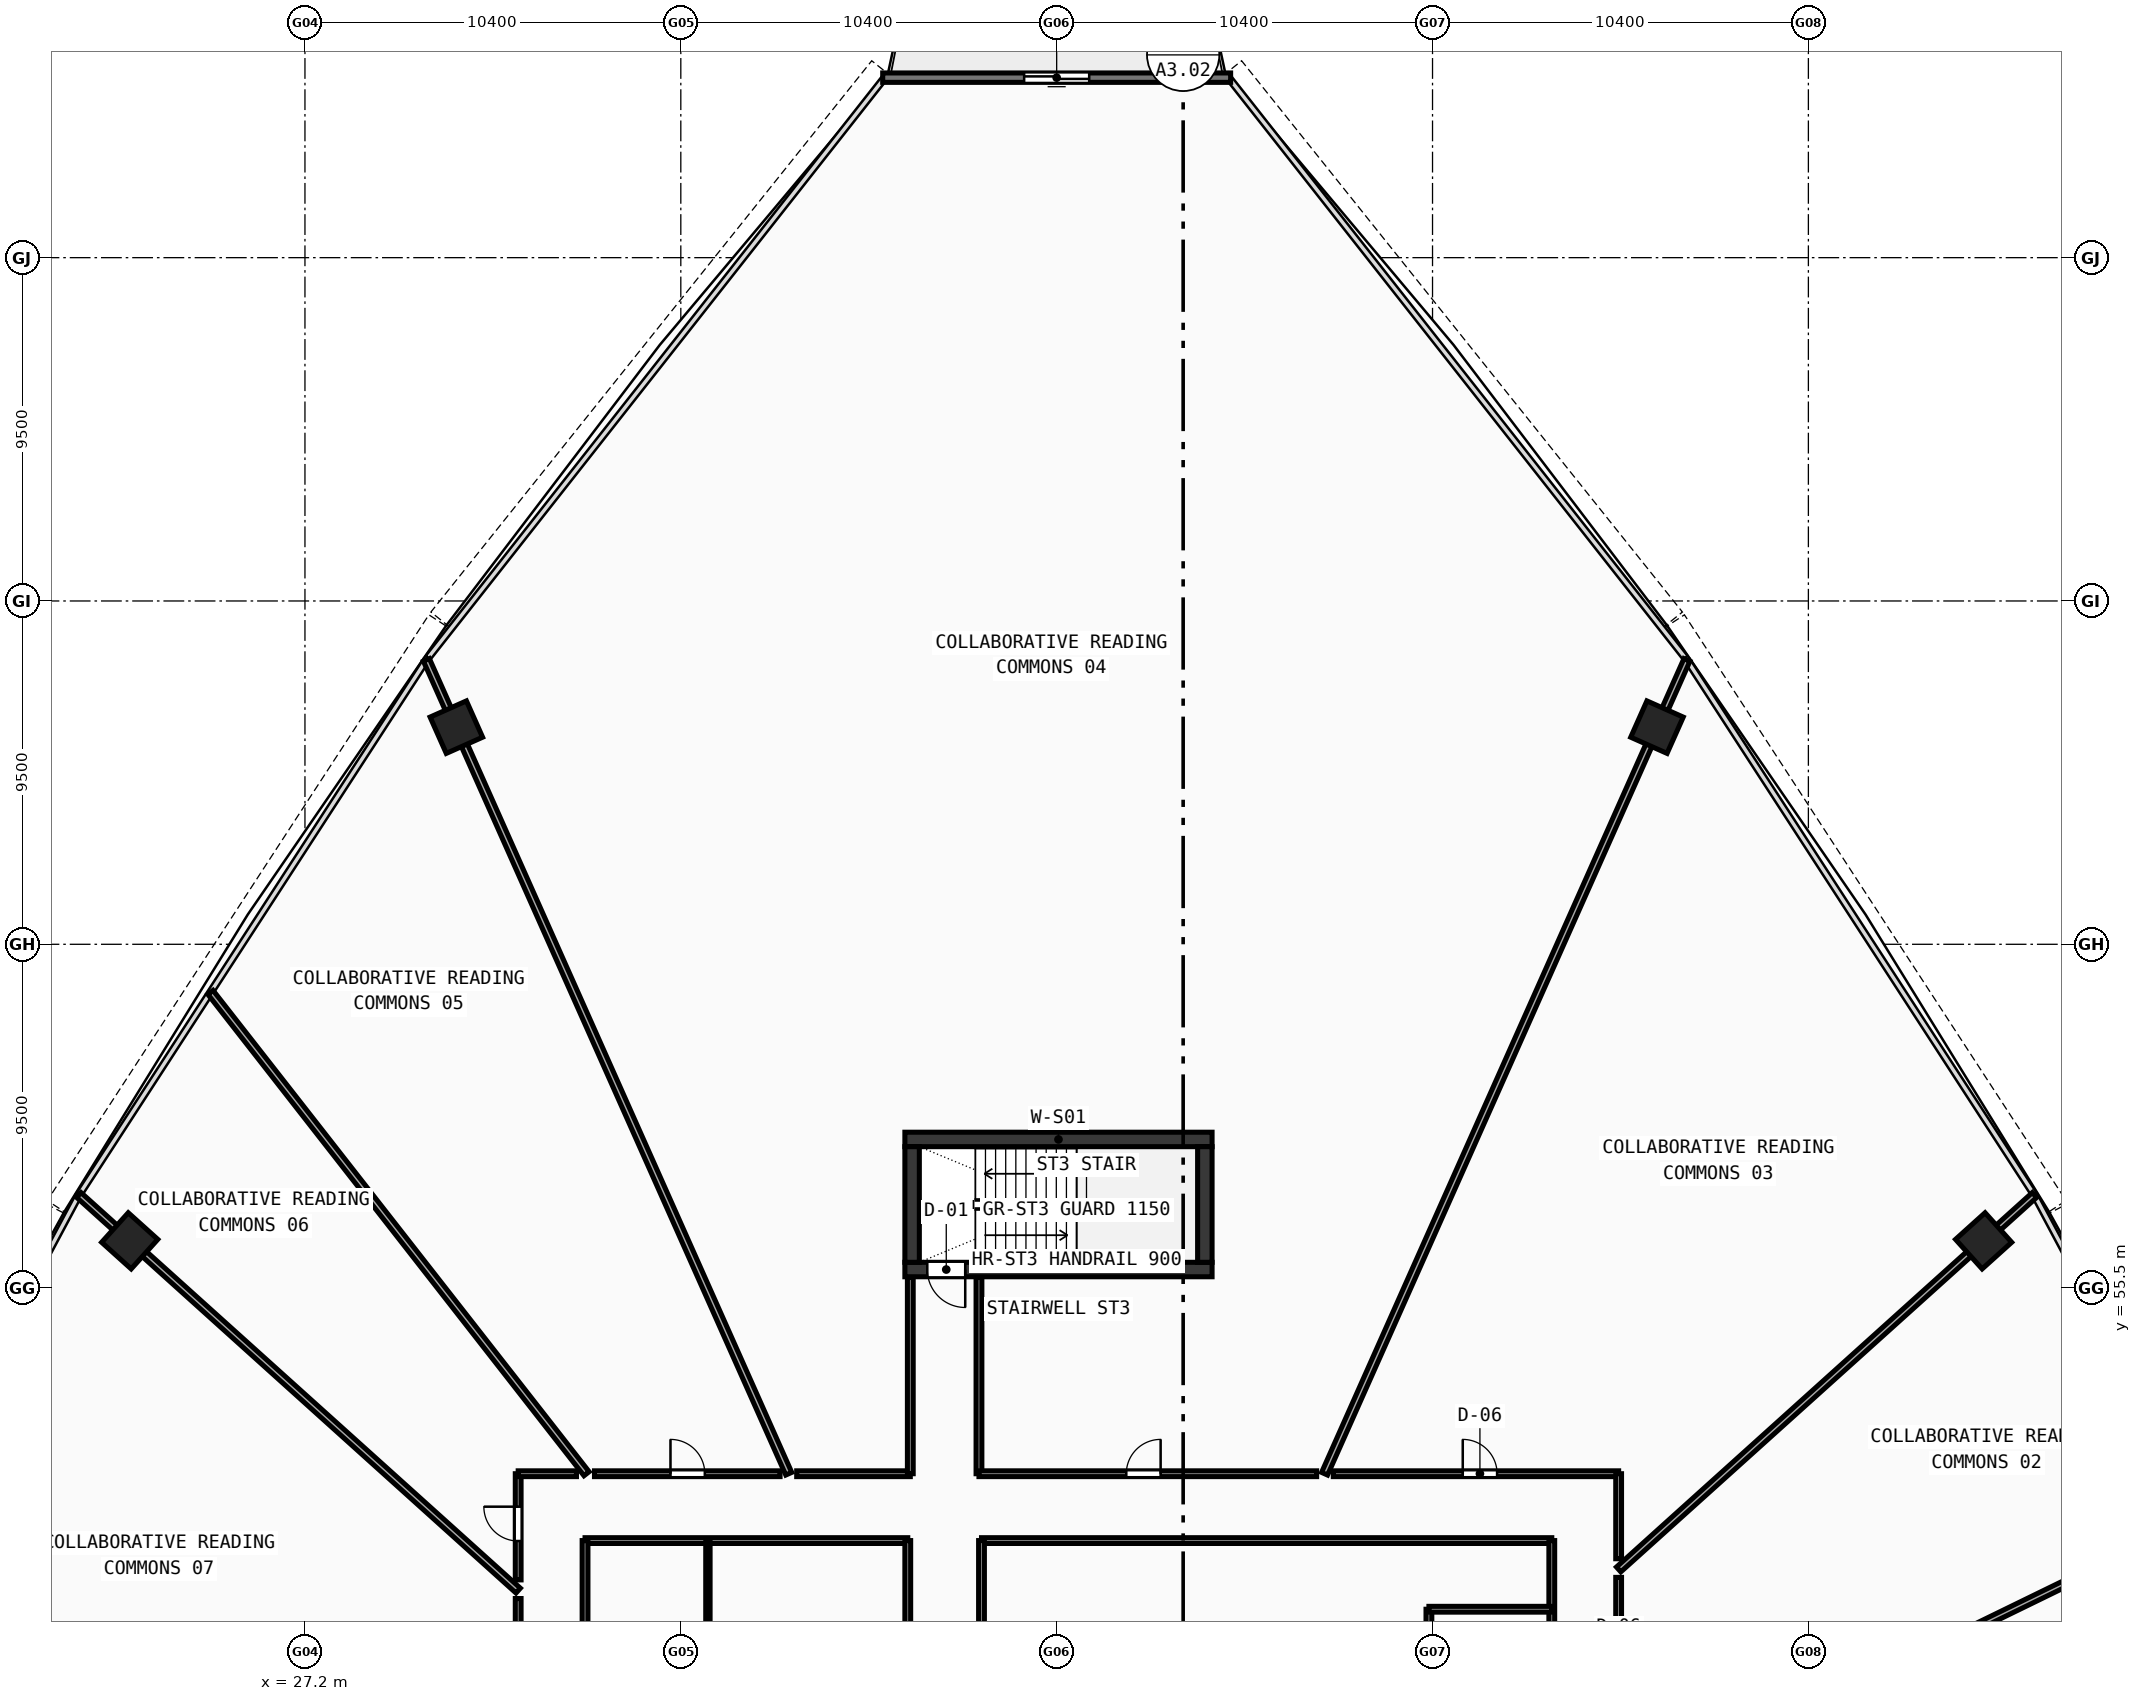
"""IFC4 building model, lengths in metres.
Left out: names, types, materials, properties, quantities, classifications, styles, units other than length and angle.
Written with IfcOpenShell. Run it as: python <this file> out.ifc"""

import sys

from ifc_helpers import new_model, si_unit, direction, frame, frame_2d, origin, origin_with_axes, origin_2d, place, context, subcontext, project, spatial, rectangle, hollow_rectangle, extrude, source, transform, mapped, element, fill, save


model = new_model("IFC4")
c1 = context("Model", 3, precision=1e-05, world=origin(), true_north=direction((0.0, 1.0)))
c2 = subcontext(c1, "Body", "Model", "MODEL_VIEW")
j1 = project(units=[si_unit("LENGTHUNIT", "METRE"), si_unit("PLANEANGLEUNIT", "RADIAN")], contexts=[c1])
p1 = place(None, origin())
s1 = spatial("IfcSite", under=j1, at=p1, CompositionType="ELEMENT")
p2 = place(p1, origin())
s2 = spatial("IfcBuilding", under=s1, at=p2, CompositionType="ELEMENT")
p3 = place(p2, frame((0.0, 0.0, 34.03)))
s3 = spatial("IfcBuildingStorey", under=s2, at=p3, CompositionType="ELEMENT", Elevation=34.03)
p4 = place(p3, frame((43.8, 59.6, 0.0), z_axis=(0.0, 0.0, 1.0), x_axis=(1.0, 0.0, 0.0)))
e1 = element("IfcWall", 1, at=p4, inside=s3, PredefinedType="SHEAR", context=c2, shape_type="SweptSolid", body=[
    extrude(rectangle(XDim=8.5, YDim=0.4, at=frame_2d((4.25, 0.0))), origin(), (0.0, 0.0, 1.0), 3.37),
])
p5 = place(p3, frame((43.8, 56.0, 0.0), z_axis=(0.0, 0.0, 1.0), x_axis=(1.0, 0.0, 0.0)))
e2 = element("IfcWall", 2, at=p5, inside=s3, PredefinedType="SHEAR", context=c2, shape_type="SweptSolid", body=[
    extrude(rectangle(XDim=8.5, YDim=0.4, at=frame_2d((4.25, 0.0))), origin(), (0.0, 0.0, 1.0), 3.37),
])
p6 = place(p5, frame((0.62, 0.0, 0.0)))
e3 = element("IfcOpeningElement", 3, at=p6, cuts=e2, PredefinedType="OPENING", context=c2, shape_type="SweptSolid", body=[
    extrude(rectangle(XDim=1.05, YDim=2.1, at=frame_2d((0.525, 1.05))), frame((0.0, 0.21, 0.0), z_axis=(0.0, -1.0, 0.0), x_axis=(1.0, 0.0, 0.0)), (0.0, 0.0, 1.0), 0.42),
])
for number, where, z_axis, x_axis in (
    (4, (44.0, 56.2, 0.0), (0.0, 0.0, 1.0), (0.0, 1.0, 0.0)),
    (5, (52.1, 56.2, 0.0), (0.0, 0.0, 1.0), (0.0, 1.0, 0.0)),
):
    element("IfcWall", number, at=place(p3, frame(where, z_axis=z_axis, x_axis=x_axis)), inside=s3, PredefinedType="SHEAR", context=c2, shape_type="SweptSolid", body=[
        extrude(rectangle(XDim=3.2, YDim=0.4, at=frame_2d((1.6, 0.0))), origin(), (0.0, 0.0, 1.0), 3.37),
    ])
m1 = source(origin(), c2, "Body", "SweptSolid", [
    extrude(hollow_rectangle(XDim=1.1, YDim=1.1, WallThickness=0.045, at=origin_2d()), origin(), (0.0, 0.0, 1.0), 3.63),
])
for number, where, z_axis, x_axis in (
    (6, (73.649, 56.794, -0.26), (0.0, 0.0, 1.0), (-0.669, 0.743, 0.0)),
    (7, (64.611, 71.009, -0.26), (0.0, 0.0, 1.0), (-0.914, 0.407, 0.0)),
    (8, (31.389, 71.009, -0.26), (0.0, 0.0, 1.0), (-0.914, -0.407, 0.0)),
    (9, (22.351, 56.794, -0.26), (0.0, 0.0, 1.0), (-0.669, -0.743, 0.0)),
):
    element("IfcColumn", number, at=place(p3, frame(where, z_axis=z_axis, x_axis=x_axis)), inside=s3, PredefinedType="COLUMN", context=c2, shape_type="MappedRepresentation", body=[
        mapped(m1, transform((0.0, 0.0, 0.0), scale=1.0)),
    ])
p7 = place(p3, frame((52.814, 88.981, 0.0), z_axis=(0.0, 0.0, 1.0), x_axis=(-1.0, 0.0, 0.0)))
e10 = element("IfcWall", 10, at=p7, inside=s3, PredefinedType="STANDARD", context=c2, shape_type="SweptSolid", body=[
    extrude(rectangle(XDim=9.627, YDim=0.26, at=frame_2d((4.814, 0.0))), origin(), (0.0, 0.0, 1.0), 3.37),
])
p8 = place(p7, frame((3.914, 0.0, 0.0)))
e11 = element("IfcOpeningElement", 11, at=p8, cuts=e10, PredefinedType="OPENING", context=c2, shape_type="SweptSolid", body=[
    extrude(rectangle(XDim=1.8, YDim=2.15, at=frame_2d((0.9, 1.075))), frame((0.0, 0.14, 0.0), z_axis=(0.0, -1.0, 0.0), x_axis=(1.0, 0.0, 0.0)), (0.0, 0.0, 1.0), 0.28),
])
p9 = place(p3, frame((34.95, 48.5, 0.0), z_axis=(0.0, 0.0, 1.0), x_axis=(1.0, 0.0, 0.0)))
e12 = element("IfcWall", 12, at=p9, inside=s3, PredefinedType="PARTITIONING", context=c2, shape_type="SweptSolid", body=[
    extrude(rectangle(XDim=8.93, YDim=0.16, at=frame_2d((4.465, 0.0))), origin(), (0.0, 0.0, 1.0), 2.67),
])
for number, where, z_axis, x_axis in (
    (13, (34.95, 42.25, 0.0), (0.0, 0.0, 1.0), (0.0, 1.0, 0.0)),
    (14, (43.88, 42.25, 0.0), (0.0, 0.0, 1.0), (0.0, 1.0, 0.0)),
):
    element("IfcWall", number, at=place(p3, frame(where, z_axis=z_axis, x_axis=x_axis)), inside=s3, PredefinedType="PARTITIONING", context=c2, shape_type="SweptSolid", body=[
        extrude(rectangle(XDim=6.25, YDim=0.16, at=frame_2d((3.125, 0.0))), origin(), (0.0, 0.0, 1.0), 2.67),
    ])
p10 = place(p3, frame((38.35, 42.25, 0.0), z_axis=(0.0, 0.0, 1.0), x_axis=(0.0, 1.0, 0.0)))
e15 = element("IfcWall", 15, at=p10, inside=s3, PredefinedType="PARTITIONING", context=c2, shape_type="SweptSolid", body=[
    extrude(rectangle(XDim=6.25, YDim=0.12, at=frame_2d((3.125, 0.0))), origin(), (0.0, 0.0, 1.0), 2.67),
])
p11 = place(p3, frame((45.92, 48.5, 0.0), z_axis=(0.0, 0.0, 1.0), x_axis=(1.0, 0.0, 0.0)))
e16 = element("IfcWall", 16, at=p11, inside=s3, PredefinedType="PARTITIONING", context=c2, shape_type="SweptSolid", body=[
    extrude(rectangle(XDim=15.78, YDim=0.16, at=frame_2d((7.89, 0.0))), origin(), (0.0, 0.0, 1.0), 2.67),
])
p12 = place(p3, frame((45.92, 42.25, 0.0), z_axis=(0.0, 0.0, 1.0), x_axis=(0.0, 1.0, 0.0)))
e17 = element("IfcWall", 17, at=p12, inside=s3, PredefinedType="PARTITIONING", context=c2, shape_type="SweptSolid", body=[
    extrude(rectangle(XDim=6.25, YDim=0.16, at=frame_2d((3.125, 0.0))), origin(), (0.0, 0.0, 1.0), 3.37),
])
p13 = place(p3, frame((61.7, 42.25, 0.0), z_axis=(0.0, 0.0, 1.0), x_axis=(0.0, 1.0, 0.0)))
e18 = element("IfcWall", 18, at=p13, inside=s3, PredefinedType="PARTITIONING", context=c2, shape_type="SweptSolid", body=[
    extrude(rectangle(XDim=6.25, YDim=0.16, at=frame_2d((3.125, 0.0))), origin(), (0.0, 0.0, 1.0), 2.67),
])
p14 = place(p3, frame((58.3, 42.25, 0.0), z_axis=(0.0, 0.0, 1.0), x_axis=(0.0, 1.0, 0.0)))
e19 = element("IfcWall", 19, at=p14, inside=s3, PredefinedType="PARTITIONING", context=c2, shape_type="SweptSolid", body=[
    extrude(rectangle(XDim=4.35, YDim=0.16, at=frame_2d((2.175, 0.0))), origin(), (0.0, 0.0, 1.0), 2.67),
])
p15 = place(p3, frame((58.3, 46.6, 0.0), z_axis=(0.0, 0.0, 1.0), x_axis=(1.0, 0.0, 0.0)))
e20 = element("IfcWall", 20, at=p15, inside=s3, PredefinedType="PARTITIONING", context=c2, shape_type="SweptSolid", body=[
    extrude(rectangle(XDim=3.4, YDim=0.16, at=frame_2d((1.7, 0.0))), origin(), (0.0, 0.0, 1.0), 2.97),
])
p16 = place(p3, frame((63.55, 41.284, 0.0), z_axis=(0.0, 0.0, 1.0), x_axis=(0.898792344086, 0.438374636825, 0.0)))
e21 = element("IfcWall", 21, at=p16, inside=s3, PredefinedType="PARTITIONING", context=c2, shape_type="SweptSolid", body=[
    extrude(rectangle(XDim=18.064, YDim=0.18, at=frame_2d((9.032, 0.0))), origin(), (0.0, 0.0, 1.0), 2.67),
])
p17 = place(p3, frame((63.55, 47.701, 0.0), z_axis=(0.0, 0.0, 1.0), x_axis=(0.743145159556, 0.669130235326, 0.0)))
e22 = element("IfcWall", 22, at=p17, inside=s3, PredefinedType="PARTITIONING", context=c2, shape_type="SweptSolid", body=[
    extrude(rectangle(XDim=15.483, YDim=0.18, at=frame_2d((7.742, 0.0))), origin(), (0.0, 0.0, 1.0), 2.67),
])
for number, where, z_axis, x_axis in (
    (23, (55.413, 50.35, 0.0), (0.0, 0.0, 1.0), (0.407, 0.914, 0.0)),
    (24, (40.587, 50.35, 0.0), (0.0, 0.0, 1.0), (-0.407, 0.914, 0.0)),
):
    element("IfcWall", number, at=place(p3, frame(where, z_axis=z_axis, x_axis=x_axis)), inside=s3, PredefinedType="PARTITIONING", context=c2, shape_type="SweptSolid", body=[
        extrude(rectangle(XDim=24.65, YDim=0.18, at=frame_2d((12.325, 0.0))), origin(), (0.0, 0.0, 1.0), 2.67),
    ])
p18 = place(p3, frame((34.992, 50.35, 0.0), z_axis=(0.0, 0.0, 1.0), x_axis=(-0.615670109541, 0.788004007742, 0.0)))
e25 = element("IfcWall", 25, at=p18, inside=s3, PredefinedType="PARTITIONING", context=c2, shape_type="SweptSolid", body=[
    extrude(rectangle(XDim=16.902, YDim=0.18, at=frame_2d((8.451, 0.0))), origin(), (0.0, 0.0, 1.0), 2.67),
])
p19 = place(p3, frame((33.1, 47.116, 0.0), z_axis=(0.0, 0.0, 1.0), x_axis=(-0.74314347906, 0.669132101704, 0.0)))
e26 = element("IfcWall", 26, at=p19, inside=s3, PredefinedType="PARTITIONING", context=c2, shape_type="SweptSolid", body=[
    extrude(rectangle(XDim=16.358, YDim=0.18, at=frame_2d((8.179, 0.0))), origin(), (0.0, 0.0, 1.0), 2.67),
])
p20 = place(p3, frame((33.1, 38.773, 0.0), z_axis=(0.0, 0.0, 1.0), x_axis=(0.0, 1.0, 0.0)))
e27 = element("IfcWall", 27, at=p20, inside=s3, PredefinedType="PARTITIONING", context=c2, shape_type="SweptSolid", body=[
    extrude(rectangle(XDim=8.124, YDim=0.16, at=frame_2d((4.062, 0.0))), origin(), (0.0, 0.0, 1.0), 2.67),
])
p21 = place(p20, frame((3.581, 0.0, 0.0)))
e28 = element("IfcOpeningElement", 28, at=p21, cuts=e27, PredefinedType="OPENING", context=c2, shape_type="SweptSolid", body=[
    extrude(rectangle(XDim=0.95, YDim=2.1, at=frame_2d((0.475, 1.05))), frame((0.0, 0.09, 0.0), z_axis=(0.0, -1.0, 0.0), x_axis=(1.0, 0.0, 0.0)), (0.0, 0.0, 1.0), 0.18),
])
p22 = place(p3, frame((33.1, 47.412, 0.0), z_axis=(0.0, 0.0, 1.0), x_axis=(0.0, 1.0, 0.0)))
e29 = element("IfcWall", 29, at=p22, inside=s3, PredefinedType="PARTITIONING", context=c2, shape_type="SweptSolid", body=[
    extrude(rectangle(XDim=2.938, YDim=0.16, at=frame_2d((1.469, 0.0))), origin(), (0.0, 0.0, 1.0), 3.37),
])
p23 = place(p22, frame((1.076, 0.0, 0.0)))
e30 = element("IfcOpeningElement", 30, at=p23, cuts=e29, PredefinedType="OPENING", context=c2, shape_type="SweptSolid", body=[
    extrude(rectangle(XDim=0.95, YDim=2.1, at=frame_2d((0.475, 1.05))), frame((0.0, 0.09, 0.0), z_axis=(0.0, -1.0, 0.0), x_axis=(1.0, 0.0, 0.0)), (0.0, 0.0, 1.0), 0.18),
])
p24 = place(p3, frame((33.1, 50.35, 0.0), z_axis=(0.0, 0.0, 1.0), x_axis=(1.0, 0.0, 0.0)))
e31 = element("IfcWall", 31, at=p24, inside=s3, PredefinedType="PARTITIONING", context=c2, shape_type="SweptSolid", body=[
    extrude(rectangle(XDim=1.612, YDim=0.16, at=frame_2d((0.806, 0.0))), origin(), (0.0, 0.0, 1.0), 3.37),
])
p25 = place(p3, frame((35.211, 50.35, 0.0), z_axis=(0.0, 0.0, 1.0), x_axis=(1.0, 0.0, 0.0)))
e32 = element("IfcWall", 32, at=p25, inside=s3, PredefinedType="PARTITIONING", context=c2, shape_type="SweptSolid", body=[
    extrude(rectangle(XDim=5.135, YDim=0.16, at=frame_2d((2.567, 0.0))), origin(), (0.0, 0.0, 1.0), 2.97),
])
p26 = place(p25, frame((2.103, 0.0, 0.0)))
e33 = element("IfcOpeningElement", 33, at=p26, cuts=e32, PredefinedType="OPENING", context=c2, shape_type="SweptSolid", body=[
    extrude(rectangle(XDim=0.95, YDim=2.1, at=frame_2d((0.475, 1.05))), frame((0.0, 0.09, 0.0), z_axis=(0.0, -1.0, 0.0), x_axis=(1.0, 0.0, 0.0)), (0.0, 0.0, 1.0), 0.18),
])
p27 = place(p3, frame((40.807, 50.35, 0.0), z_axis=(0.0, 0.0, 1.0), x_axis=(1.0, 0.0, 0.0)))
e34 = element("IfcWall", 34, at=p27, inside=s3, PredefinedType="PARTITIONING", context=c2, shape_type="SweptSolid", body=[
    extrude(rectangle(XDim=3.143, YDim=0.16, at=frame_2d((1.572, 0.0))), origin(), (0.0, 0.0, 1.0), 2.67),
])
for number, where, z_axis, x_axis in (
    (35, (43.95, 50.35, 0.0), (0.0, 0.0, 1.0), (0.0, 1.0, 0.0)),
    (36, (45.85, 55.78, 0.0), (0.0, 0.0, 1.0), (0.0, -1.0, 0.0)),
):
    element("IfcWall", number, at=place(p3, frame(where, z_axis=z_axis, x_axis=x_axis)), inside=s3, PredefinedType="PARTITIONING", context=c2, shape_type="SweptSolid", body=[
        extrude(rectangle(XDim=5.43, YDim=0.16, at=frame_2d((2.715, 0.0))), origin(), (0.0, 0.0, 1.0), 2.97),
    ])
p28 = place(p3, frame((45.85, 50.35, 0.0), z_axis=(0.0, 0.0, 1.0), x_axis=(1.0, 0.0, 0.0)))
e37 = element("IfcWall", 37, at=p28, inside=s3, PredefinedType="PARTITIONING", context=c2, shape_type="SweptSolid", body=[
    extrude(rectangle(XDim=9.343, YDim=0.16, at=frame_2d((4.672, 0.0))), origin(), (0.0, 0.0, 1.0), 2.67),
])
p29 = place(p28, frame((4.076, 0.0, 0.0)))
e38 = element("IfcOpeningElement", 38, at=p29, cuts=e37, PredefinedType="OPENING", context=c2, shape_type="SweptSolid", body=[
    extrude(rectangle(XDim=0.95, YDim=2.1, at=frame_2d((0.475, 1.05))), frame((0.0, 0.09, 0.0), z_axis=(0.0, -1.0, 0.0), x_axis=(1.0, 0.0, 0.0)), (0.0, 0.0, 1.0), 0.18),
])
p30 = place(p3, frame((55.654, 50.35, 0.0), z_axis=(0.0, 0.0, 1.0), x_axis=(1.0, 0.0, 0.0)))
e39 = element("IfcWall", 39, at=p30, inside=s3, PredefinedType="PARTITIONING", context=c2, shape_type="SweptSolid", body=[
    extrude(rectangle(XDim=7.896, YDim=0.16, at=frame_2d((3.948, 0.0))), origin(), (0.0, 0.0, 1.0), 2.97),
])
p31 = place(p30, frame((3.583, 0.0, 0.0)))
e40 = element("IfcOpeningElement", 40, at=p31, cuts=e39, PredefinedType="OPENING", context=c2, shape_type="SweptSolid", body=[
    extrude(rectangle(XDim=0.95, YDim=2.1, at=frame_2d((0.475, 1.05))), frame((0.0, 0.09, 0.0), z_axis=(0.0, -1.0, 0.0), x_axis=(1.0, 0.0, 0.0)), (0.0, 0.0, 1.0), 0.18),
])
p32 = place(p3, frame((63.55, 50.35, 0.0), z_axis=(0.0, 0.0, 1.0), x_axis=(0.0, -1.0, 0.0)))
e41 = element("IfcWall", 41, at=p32, inside=s3, PredefinedType="PARTITIONING", context=c2, shape_type="SweptSolid", body=[
    extrude(rectangle(XDim=2.353, YDim=0.16, at=frame_2d((1.176, 0.0))), origin(), (0.0, 0.0, 1.0), 3.37),
])
p33 = place(p3, frame((63.55, 47.482, 0.0), z_axis=(0.0, 0.0, 1.0), x_axis=(0.0, -1.0, 0.0)))
e42 = element("IfcWall", 42, at=p33, inside=s3, PredefinedType="PARTITIONING", context=c2, shape_type="SweptSolid", body=[
    extrude(rectangle(XDim=5.953, YDim=0.16, at=frame_2d((2.976, 0.0))), origin(), (0.0, 0.0, 1.0), 2.67),
])
p34 = place(p33, frame((2.514, 0.0, 0.0)))
e43 = element("IfcOpeningElement", 43, at=p34, cuts=e42, PredefinedType="OPENING", context=c2, shape_type="SweptSolid", body=[
    extrude(rectangle(XDim=0.95, YDim=2.1, at=frame_2d((0.475, 1.05))), frame((0.0, 0.09, 0.0), z_axis=(0.0, -1.0, 0.0), x_axis=(1.0, 0.0, 0.0)), (0.0, 0.0, 1.0), 0.18),
])
m2 = source(origin(), c2, "Body", "SweptSolid", [
    extrude(rectangle(XDim=1.8, YDim=2.15, at=frame_2d((0.9, 1.075))), frame((0.0, 0.025, 0.0), z_axis=(0.0, -1.0, 0.0), x_axis=(1.0, 0.0, 0.0)), (0.0, 0.0, 1.0), 0.05),
])
p35 = place(p8, origin_with_axes())
e44 = element("IfcDoor", 44, at=p35, inside=s3, OperationType="DOUBLE_DOOR_SLIDING", PredefinedType="DOOR", context=c2, shape_type="MappedRepresentation", body=[
    mapped(m2, transform((0.0, 0.0, 0.0), scale=1.0)),
])
fill(e11, e44)
m3 = source(origin(), c2, "Body", "SweptSolid", [
    extrude(rectangle(XDim=1.05, YDim=2.1, at=frame_2d((0.525, 1.05))), frame((0.0, 0.025, 0.0), z_axis=(0.0, -1.0, 0.0), x_axis=(1.0, 0.0, 0.0)), (0.0, 0.0, 1.0), 0.05),
])
p36 = place(p6, frame((1.05, 0.0, 0.0), z_axis=(0.0, 0.0, 1.0), x_axis=(-1.0, 0.0, 0.0)))
e45 = element("IfcDoor", 45, at=p36, inside=s3, OperationType="SINGLE_SWING_LEFT", PredefinedType="DOOR", context=c2, shape_type="MappedRepresentation", body=[
    mapped(m3, transform((0.0, 0.0, 0.0), scale=1.0)),
])
fill(e3, e45)
m4 = source(origin(), c2, "Body", "SweptSolid", [
    extrude(rectangle(XDim=0.95, YDim=2.1, at=frame_2d((0.475, 1.05))), frame((0.0, 0.025, 0.0), z_axis=(0.0, -1.0, 0.0), x_axis=(1.0, 0.0, 0.0)), (0.0, 0.0, 1.0), 0.05),
])
p37 = place(p31, origin_with_axes())
e46 = element("IfcDoor", 46, at=p37, inside=s3, OperationType="SINGLE_SWING_LEFT", PredefinedType="DOOR", context=c2, shape_type="MappedRepresentation", body=[
    mapped(m4, transform((0.0, 0.0, 0.0), scale=1.0)),
])
fill(e40, e46)
p38 = place(p29, origin_with_axes())
e47 = element("IfcDoor", 47, at=p38, inside=s3, OperationType="SINGLE_SWING_RIGHT", PredefinedType="DOOR", context=c2, shape_type="MappedRepresentation", body=[
    mapped(m4, transform((0.0, 0.0, 0.0), scale=1.0)),
])
fill(e38, e47)
p39 = place(p26, origin_with_axes())
e48 = element("IfcDoor", 48, at=p39, inside=s3, OperationType="SINGLE_SWING_LEFT", PredefinedType="DOOR", context=c2, shape_type="MappedRepresentation", body=[
    mapped(m4, transform((0.0, 0.0, 0.0), scale=1.0)),
])
fill(e33, e48)
p40 = place(p23, origin_with_axes())
e49 = element("IfcDoor", 49, at=p40, inside=s3, OperationType="SINGLE_SWING_RIGHT", PredefinedType="DOOR", context=c2, shape_type="MappedRepresentation", body=[
    mapped(m4, transform((0.0, 0.0, 0.0), scale=1.0)),
])
fill(e30, e49)
save(model, sys.argv[1])
